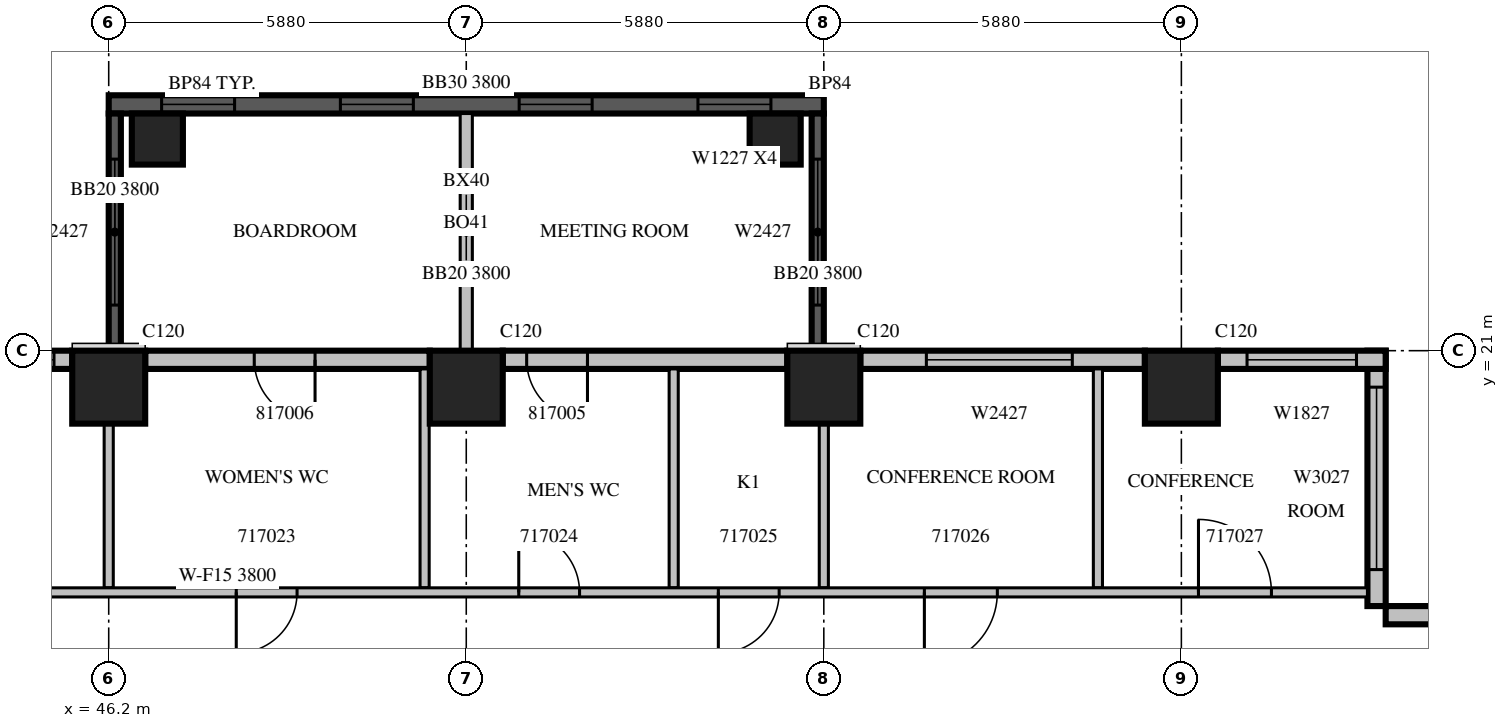
"""IFC4 building model, lengths in metres.
Left out: names, types, materials, properties, quantities, classifications, styles, units other than length and angle.
Written with IfcOpenShell. Run it as: python <this file> out.ifc"""

import sys

from ifc_helpers import new_model, si_unit, direction, frame, frame_2d, origin, origin_2d, place, context, subcontext, project, spatial, rectangle, extrude, source, transform, mapped, element, fill, save


model = new_model("IFC4")
c1 = context("Model", 3, precision=1e-05, world=origin(), true_north=direction((0.0, 1.0)))
c2 = subcontext(c1, "Body", "Model", "MODEL_VIEW")
j1 = project(units=[si_unit("LENGTHUNIT", "METRE"), si_unit("PLANEANGLEUNIT", "RADIAN")], contexts=[c1])
p1 = place(None, origin())
s1 = spatial("IfcSite", under=j1, at=p1, CompositionType="ELEMENT")
p2 = place(p1, origin())
s2 = spatial("IfcBuilding", under=s1, at=p2, CompositionType="ELEMENT")
p3 = place(p2, frame((0.0, 0.0, 82.5)))
s3 = spatial("IfcBuildingStorey", under=s2, at=p3, CompositionType="ELEMENT", Elevation=82.5)
m1 = source(origin(), c2, "Body", "SweptSolid", [
    extrude(rectangle(XDim=1.2, YDim=1.2, at=origin_2d()), origin(), (0.0, 0.0, 1.0), 4.2),
])
for number, where, z_axis, x_axis in (
    (1, (46.2, 20.4, 0.0), (0.0, 0.0, 1.0), (1.0, 0.0, 0.0)),
    (2, (52.08, 20.4, 0.0), (0.0, 0.0, 1.0), (1.0, 0.0, 0.0)),
    (3, (57.96, 20.4, 0.0), (0.0, 0.0, 1.0), (1.0, 0.0, 0.0)),
    (4, (63.84, 20.4, 0.0), (0.0, 0.0, 1.0), (1.0, 0.0, 0.0)),
):
    element("IfcColumn", number, at=place(p3, frame(where, z_axis=z_axis, x_axis=x_axis)), inside=s3, PredefinedType="COLUMN", context=c2, shape_type="MappedRepresentation", body=[
        mapped(m1, transform((0.0, 0.0, 0.0), scale=1.0)),
    ])
m2 = source(origin(), c2, "Body", "SweptSolid", [
    extrude(rectangle(XDim=0.84, YDim=0.84, at=origin_2d()), origin(), (0.0, 0.0, 1.0), 4.2),
])
for number, where, z_axis, x_axis in (
    (5, (47.0, 24.48, 0.0), (0.0, 0.0, 1.0), (1.0, 0.0, 0.0)),
    (6, (57.16, 24.48, 0.0), (0.0, 0.0, 1.0), (1.0, 0.0, 0.0)),
):
    element("IfcColumn", number, at=place(p3, frame(where, z_axis=z_axis, x_axis=x_axis)), inside=s3, PredefinedType="COLUMN", context=c2, shape_type="MappedRepresentation", body=[
        mapped(m2, transform((0.0, 0.0, 0.0), scale=1.0)),
    ])
p4 = place(p3, frame((57.96, 25.05, 0.0), z_axis=(0.0, 0.0, 1.0), x_axis=(-1.0, 0.0, 0.0)))
e7 = element("IfcWall", 7, at=p4, inside=s3, PredefinedType="SOLIDWALL", context=c2, shape_type="SweptSolid", body=[
    extrude(rectangle(XDim=11.76, YDim=0.3, at=frame_2d((5.88, 0.0))), origin(), (0.0, 0.0, 1.0), 3.8),
])
m3 = source(origin(), c2, "Body", "SweptSolid", [
    extrude(rectangle(XDim=1.2, YDim=2.7, at=frame_2d((0.6, 1.35))), frame((0.0, 0.16, 0.0), z_axis=(0.0, -1.0, 0.0), x_axis=(1.0, 0.0, 0.0)), (0.0, 0.0, 1.0), 0.32),
])
p5 = place(p4, frame((0.87, 0.0, 0.6)))
e8 = element("IfcOpeningElement", 8, at=p5, cuts=e7, PredefinedType="OPENING", context=c2, shape_type="MappedRepresentation", body=[
    mapped(m3, transform((0.0, 0.0, 0.0), scale=1.0)),
])
p6 = place(p4, frame((3.81, 0.0, 0.6)))
e9 = element("IfcOpeningElement", 9, at=p6, cuts=e7, PredefinedType="OPENING", context=c2, shape_type="MappedRepresentation", body=[
    mapped(m3, transform((0.0, 0.0, 0.0), scale=1.0)),
])
p7 = place(p4, frame((6.75, 0.0, 0.6)))
e10 = element("IfcOpeningElement", 10, at=p7, cuts=e7, PredefinedType="OPENING", context=c2, shape_type="MappedRepresentation", body=[
    mapped(m3, transform((0.0, 0.0, 0.0), scale=1.0)),
])
p8 = place(p4, frame((9.69, 0.0, 0.6)))
e11 = element("IfcOpeningElement", 11, at=p8, cuts=e7, PredefinedType="OPENING", context=c2, shape_type="MappedRepresentation", body=[
    mapped(m3, transform((0.0, 0.0, 0.0), scale=1.0)),
])
p9 = place(p3, frame((52.08, 21.0, 0.0), z_axis=(0.0, 0.0, 1.0), x_axis=(0.0, 1.0, 0.0)))
e12 = element("IfcWall", 12, at=p9, inside=s3, PredefinedType="SOLIDWALL", context=c2, shape_type="SweptSolid", body=[
    extrude(rectangle(XDim=3.9, YDim=0.2, at=frame_2d((1.95, 0.0))), origin(), (0.0, 0.0, 1.0), 3.8),
])
m4 = source(origin(), c2, "Body", "SweptSolid", [
    extrude(rectangle(XDim=3.9, YDim=0.2, at=frame_2d((1.95, 0.0))), origin(), (0.0, 0.0, 1.0), 3.8),
])
p10 = place(p3, frame((57.86, 21.0, 0.0), z_axis=(0.0, 0.0, 1.0), x_axis=(0.0, 1.0, 0.0)))
e13 = element("IfcWall", 13, at=p10, inside=s3, PredefinedType="SOLIDWALL", context=c2, shape_type="MappedRepresentation", body=[
    mapped(m4, transform((0.0, 0.0, 0.0), scale=1.0)),
])
m5 = source(origin(), c2, "Body", "SweptSolid", [
    extrude(rectangle(XDim=2.4, YDim=2.7, at=frame_2d((1.2, 1.35))), frame((0.0, 0.11, 0.0), z_axis=(0.0, -1.0, 0.0), x_axis=(1.0, 0.0, 0.0)), (0.0, 0.0, 1.0), 0.22),
])
p11 = place(p10, frame((0.75, 0.0, 0.6)))
e14 = element("IfcOpeningElement", 14, at=p11, cuts=e13, PredefinedType="OPENING", context=c2, shape_type="MappedRepresentation", body=[
    mapped(m5, transform((0.0, 0.0, 0.0), scale=1.0)),
])
p12 = place(p3, frame((46.3, 21.0, 0.0), z_axis=(0.0, 0.0, 1.0), x_axis=(0.0, 1.0, 0.0)))
e15 = element("IfcWall", 15, at=p12, inside=s3, PredefinedType="SOLIDWALL", context=c2, shape_type="MappedRepresentation", body=[
    mapped(m4, transform((0.0, 0.0, 0.0), scale=1.0)),
])
p13 = place(p12, frame((0.75, 0.0, 0.6)))
e16 = element("IfcOpeningElement", 16, at=p13, cuts=e15, PredefinedType="OPENING", context=c2, shape_type="MappedRepresentation", body=[
    mapped(m5, transform((0.0, 0.0, 0.0), scale=1.0)),
])
m6 = source(origin(), c2, "Body", "SweptSolid", [
    extrude(rectangle(XDim=4.2, YDim=0.3, at=frame_2d((2.1, 0.0))), origin(), (0.0, 0.0, 1.0), 3.8),
])
p14 = place(p3, frame((71.4, 16.65, 0.0), z_axis=(0.0, 0.0, 1.0), x_axis=(-1.0, 0.0, 0.0)))
e17 = element("IfcWall", 17, at=p14, inside=s3, PredefinedType="STANDARD", context=c2, shape_type="MappedRepresentation", body=[
    mapped(m6, transform((0.0, 0.0, 0.0), scale=1.0)),
])
p15 = place(p14, frame((0.66, 0.0, 0.6)))
e18 = element("IfcOpeningElement", 18, at=p15, cuts=e17, PredefinedType="OPENING", context=c2, shape_type="MappedRepresentation", body=[
    mapped(m3, transform((0.0, 0.0, 0.0), scale=1.0)),
])
p16 = place(p3, frame((67.05, 16.8, 0.0), z_axis=(0.0, 0.0, 1.0), x_axis=(0.0, 1.0, 0.0)))
e19 = element("IfcWall", 19, at=p16, inside=s3, PredefinedType="STANDARD", context=c2, shape_type="MappedRepresentation", body=[
    mapped(m6, transform((0.0, 0.0, 0.0), scale=1.0)),
])
m7 = source(origin(), c2, "Body", "SweptSolid", [
    extrude(rectangle(XDim=3.0, YDim=2.7, at=frame_2d((1.5, 1.35))), frame((0.0, 0.16, 0.0), z_axis=(0.0, -1.0, 0.0), x_axis=(1.0, 0.0, 0.0)), (0.0, 0.0, 1.0), 0.32),
])
p17 = place(p16, frame((0.6, 0.0, 0.6)))
e20 = element("IfcOpeningElement", 20, at=p17, cuts=e19, PredefinedType="OPENING", context=c2, shape_type="MappedRepresentation", body=[
    mapped(m7, transform((0.0, 0.0, 0.0), scale=1.0)),
])
m8 = source(origin(), c2, "Body", "SweptSolid", [
    extrude(rectangle(XDim=2.76, YDim=0.3, at=frame_2d((1.38, 0.0))), origin(), (0.0, 0.0, 1.0), 3.8),
])
p18 = place(p3, frame((67.2, 20.85, 0.0), z_axis=(0.0, 0.0, 1.0), x_axis=(-1.0, 0.0, 0.0)))
e21 = element("IfcWall", 21, at=p18, inside=s3, PredefinedType="STANDARD", context=c2, shape_type="MappedRepresentation", body=[
    mapped(m8, transform((0.0, 0.0, 0.0), scale=1.0)),
])
m9 = source(origin(), c2, "Body", "SweptSolid", [
    extrude(rectangle(XDim=1.8, YDim=2.7, at=frame_2d((0.9, 1.35))), frame((0.0, 0.16, 0.0), z_axis=(0.0, -1.0, 0.0), x_axis=(1.0, 0.0, 0.0)), (0.0, 0.0, 1.0), 0.32),
])
p19 = place(p18, frame((0.48, 0.0, 0.6)))
e22 = element("IfcOpeningElement", 22, at=p19, cuts=e21, PredefinedType="OPENING", context=c2, shape_type="MappedRepresentation", body=[
    mapped(m9, transform((0.0, 0.0, 0.0), scale=1.0)),
])
m10 = source(origin(), c2, "Body", "SweptSolid", [
    extrude(rectangle(XDim=4.68, YDim=0.3, at=frame_2d((2.34, 0.0))), origin(), (0.0, 0.0, 1.0), 3.8),
])
p20 = place(p3, frame((63.24, 20.85, 0.0), z_axis=(0.0, 0.0, 1.0), x_axis=(-1.0, 0.0, 0.0)))
e23 = element("IfcWall", 23, at=p20, inside=s3, PredefinedType="STANDARD", context=c2, shape_type="MappedRepresentation", body=[
    mapped(m10, transform((0.0, 0.0, 0.0), scale=1.0)),
])
m11 = source(origin(), c2, "Body", "SweptSolid", [
    extrude(rectangle(XDim=2.4, YDim=2.7, at=frame_2d((1.2, 1.35))), frame((0.0, 0.16, 0.0), z_axis=(0.0, -1.0, 0.0), x_axis=(1.0, 0.0, 0.0)), (0.0, 0.0, 1.0), 0.32),
])
p21 = place(p20, frame((1.194, 0.0, 0.6)))
e24 = element("IfcOpeningElement", 24, at=p21, cuts=e23, PredefinedType="OPENING", context=c2, shape_type="MappedRepresentation", body=[
    mapped(m11, transform((0.0, 0.0, 0.0), scale=1.0)),
])
p22 = place(p3, frame((57.36, 20.85, 0.0), z_axis=(0.0, 0.0, 1.0), x_axis=(-1.0, 0.0, 0.0)))
e25 = element("IfcWall", 25, at=p22, inside=s3, PredefinedType="STANDARD", context=c2, shape_type="MappedRepresentation", body=[
    mapped(m10, transform((0.0, 0.0, 0.0), scale=1.0)),
])
m12 = source(origin(), c2, "Body", "SweptSolid", [
    extrude(rectangle(XDim=1.0, YDim=2.1, at=frame_2d((0.5, 1.05))), frame((0.0, 0.16, 0.0), z_axis=(0.0, -1.0, 0.0), x_axis=(1.0, 0.0, 0.0)), (0.0, 0.0, 1.0), 0.32),
])
p23 = place(p22, frame((3.287, 0.0, 0.0)))
e26 = element("IfcOpeningElement", 26, at=p23, cuts=e25, PredefinedType="OPENING", context=c2, shape_type="MappedRepresentation", body=[
    mapped(m12, transform((0.0, 0.0, 0.0), scale=1.0)),
])
p24 = place(p3, frame((51.48, 20.85, 0.0), z_axis=(0.0, 0.0, 1.0), x_axis=(-1.0, 0.0, 0.0)))
e27 = element("IfcWall", 27, at=p24, inside=s3, PredefinedType="STANDARD", context=c2, shape_type="MappedRepresentation", body=[
    mapped(m10, transform((0.0, 0.0, 0.0), scale=1.0)),
])
p25 = place(p24, frame((1.887, 0.0, 0.0)))
e28 = element("IfcOpeningElement", 28, at=p25, cuts=e27, PredefinedType="OPENING", context=c2, shape_type="MappedRepresentation", body=[
    mapped(m12, transform((0.0, 0.0, 0.0), scale=1.0)),
])
m13 = source(origin(), c2, "Body", "SweptSolid", [
    extrude(rectangle(XDim=7.2, YDim=0.3, at=frame_2d((3.6, 0.0))), origin(), (0.0, 0.0, 1.0), 3.8),
])
p26 = place(p3, frame((45.6, 20.85, 0.0), z_axis=(0.0, 0.0, 1.0), x_axis=(-1.0, 0.0, 0.0)))
e29 = element("IfcWall", 29, at=p26, inside=s3, PredefinedType="STANDARD", context=c2, shape_type="MappedRepresentation", body=[
    mapped(m13, transform((0.0, 0.0, 0.0), scale=1.0)),
])
p27 = place(p26, frame((0.3, 0.0, 0.6)))
e30 = element("IfcOpeningElement", 30, at=p27, cuts=e29, PredefinedType="OPENING", context=c2, shape_type="MappedRepresentation", body=[
    mapped(m11, transform((0.0, 0.0, 0.0), scale=1.0)),
])
p28 = place(p26, frame((3.75, 0.0, 0.6)))
e31 = element("IfcOpeningElement", 31, at=p28, cuts=e29, PredefinedType="OPENING", context=c2, shape_type="MappedRepresentation", body=[
    mapped(m11, transform((0.0, 0.0, 0.0), scale=1.0)),
])
m14 = source(origin(), c2, "Body", "SweptSolid", [
    extrude(rectangle(XDim=3.6, YDim=0.15, at=frame_2d((1.8, 0.0))), origin(), (0.0, 0.0, 1.0), 3.8),
])
for number, where, z_axis, x_axis in (
    (32, (51.395, 20.7, 0.0), (0.0, 0.0, 1.0), (0.0, -1.0, 0.0)),
    (33, (55.491, 20.7, 0.0), (0.0, 0.0, 1.0), (0.0, -1.0, 0.0)),
    (34, (62.468, 20.7, 0.0), (0.0, 0.0, 1.0), (0.0, -1.0, 0.0)),
):
    element("IfcWall", number, at=place(p3, frame(where, z_axis=z_axis, x_axis=x_axis)), inside=s3, PredefinedType="PARTITIONING", context=c2, shape_type="MappedRepresentation", body=[
        mapped(m14, transform((0.0, 0.0, 0.0), scale=1.0)),
    ])
m15 = source(origin(), c2, "Body", "SweptSolid", [
    extrude(rectangle(XDim=2.701, YDim=0.15, at=frame_2d((1.351, 0.0))), origin(), (0.0, 0.0, 1.0), 3.8),
])
for number, where, z_axis, x_axis in (
    (35, (46.2, 17.1, 0.0), (0.0, 0.0, 1.0), (0.0, 1.0, 0.0)),
    (36, (57.96, 17.1, 0.0), (0.0, 0.0, 1.0), (0.0, 1.0, 0.0)),
):
    element("IfcWall", number, at=place(p3, frame(where, z_axis=z_axis, x_axis=x_axis)), inside=s3, PredefinedType="PARTITIONING", context=c2, shape_type="MappedRepresentation", body=[
        mapped(m15, transform((0.0, 0.0, 0.0), scale=1.0)),
    ])
m16 = source(origin(), c2, "Body", "SweptSolid", [
    extrude(rectangle(XDim=37.5, YDim=0.15, at=frame_2d((18.75, 0.0))), origin(), (0.0, 0.0, 1.0), 3.8),
])
p29 = place(p3, frame((29.4, 17.025, 0.0), z_axis=(0.0, 0.0, 1.0), x_axis=(1.0, 0.0, 0.0)))
e37 = element("IfcWall", 37, at=p29, inside=s3, PredefinedType="PARTITIONING", context=c2, shape_type="MappedRepresentation", body=[
    mapped(m16, transform((0.0, 0.0, 0.0), scale=1.0)),
])
m17 = source(origin(), c2, "Body", "SweptSolid", [
    extrude(rectangle(XDim=1.0, YDim=2.1, at=frame_2d((0.5, 1.05))), frame((0.0, 0.085, 0.0), z_axis=(0.0, -1.0, 0.0), x_axis=(1.0, 0.0, 0.0)), (0.0, 0.0, 1.0), 0.17),
])
p30 = place(p29, frame((1.357, 0.0, 0.0)))
e38 = element("IfcOpeningElement", 38, at=p30, cuts=e37, PredefinedType="OPENING", context=c2, shape_type="MappedRepresentation", body=[
    mapped(m17, transform((0.0, 0.0, 0.0), scale=1.0)),
])
p31 = place(p29, frame((4.669, 0.0, 0.0)))
e39 = element("IfcOpeningElement", 39, at=p31, cuts=e37, PredefinedType="OPENING", context=c2, shape_type="MappedRepresentation", body=[
    mapped(m17, transform((0.0, 0.0, 0.0), scale=1.0)),
])
p32 = place(p29, frame((7.012, 0.0, 0.0)))
e40 = element("IfcOpeningElement", 40, at=p32, cuts=e37, PredefinedType="OPENING", context=c2, shape_type="MappedRepresentation", body=[
    mapped(m17, transform((0.0, 0.0, 0.0), scale=1.0)),
])
p33 = place(p29, frame((12.1, 0.0, 0.0)))
e41 = element("IfcOpeningElement", 41, at=p33, cuts=e37, PredefinedType="OPENING", context=c2, shape_type="MappedRepresentation", body=[
    mapped(m17, transform((0.0, 0.0, 0.0), scale=1.0)),
])
p34 = place(p29, frame((18.898, 0.0, 0.0)))
e42 = element("IfcOpeningElement", 42, at=p34, cuts=e37, PredefinedType="OPENING", context=c2, shape_type="MappedRepresentation", body=[
    mapped(m17, transform((0.0, 0.0, 0.0), scale=1.0)),
])
p35 = place(p29, frame((23.543, 0.0, 0.0)))
e43 = element("IfcOpeningElement", 43, at=p35, cuts=e37, PredefinedType="OPENING", context=c2, shape_type="MappedRepresentation", body=[
    mapped(m17, transform((0.0, 0.0, 0.0), scale=1.0)),
])
p36 = place(p29, frame((26.826, 0.0, 0.0)))
e44 = element("IfcOpeningElement", 44, at=p36, cuts=e37, PredefinedType="OPENING", context=c2, shape_type="MappedRepresentation", body=[
    mapped(m17, transform((0.0, 0.0, 0.0), scale=1.0)),
])
m18 = source(origin(), c2, "Body", "SweptSolid", [
    extrude(rectangle(XDim=1.2, YDim=2.1, at=frame_2d((0.6, 1.05))), frame((0.0, 0.085, 0.0), z_axis=(0.0, -1.0, 0.0), x_axis=(1.0, 0.0, 0.0)), (0.0, 0.0, 1.0), 0.17),
])
p37 = place(p29, frame((30.214, 0.0, 0.0)))
e45 = element("IfcOpeningElement", 45, at=p37, cuts=e37, PredefinedType="OPENING", context=c2, shape_type="MappedRepresentation", body=[
    mapped(m18, transform((0.0, 0.0, 0.0), scale=1.0)),
])
p38 = place(p29, frame((34.721, 0.0, 0.0)))
e46 = element("IfcOpeningElement", 46, at=p38, cuts=e37, PredefinedType="OPENING", context=c2, shape_type="MappedRepresentation", body=[
    mapped(m18, transform((0.0, 0.0, 0.0), scale=1.0)),
])
m19 = source(origin(), c2, "Body", "SweptSolid", [
    extrude(rectangle(XDim=1.2, YDim=2.7, at=frame_2d((0.6, 1.35))), frame((0.0, 0.03, 0.0), z_axis=(0.0, -1.0, 0.0), x_axis=(1.0, 0.0, 0.0)), (0.0, 0.0, 1.0), 0.06),
])
p39 = place(p5, origin())
e47 = element("IfcWindow", 47, at=p39, inside=s3, PartitioningType="SINGLE_PANEL", PredefinedType="WINDOW", context=c2, shape_type="MappedRepresentation", body=[
    mapped(m19, transform((0.0, 0.0, 0.0), scale=1.0)),
])
fill(e8, e47)
p40 = place(p6, origin())
e48 = element("IfcWindow", 48, at=p40, inside=s3, PartitioningType="SINGLE_PANEL", PredefinedType="WINDOW", context=c2, shape_type="MappedRepresentation", body=[
    mapped(m19, transform((0.0, 0.0, 0.0), scale=1.0)),
])
fill(e9, e48)
p41 = place(p7, origin())
e49 = element("IfcWindow", 49, at=p41, inside=s3, PartitioningType="SINGLE_PANEL", PredefinedType="WINDOW", context=c2, shape_type="MappedRepresentation", body=[
    mapped(m19, transform((0.0, 0.0, 0.0), scale=1.0)),
])
fill(e10, e49)
p42 = place(p8, origin())
e50 = element("IfcWindow", 50, at=p42, inside=s3, PartitioningType="SINGLE_PANEL", PredefinedType="WINDOW", context=c2, shape_type="MappedRepresentation", body=[
    mapped(m19, transform((0.0, 0.0, 0.0), scale=1.0)),
])
fill(e11, e50)
m20 = source(origin(), c2, "Body", "SweptSolid", [
    extrude(rectangle(XDim=2.4, YDim=2.7, at=frame_2d((1.2, 1.35))), frame((0.0, 0.03, 0.0), z_axis=(0.0, -1.0, 0.0), x_axis=(1.0, 0.0, 0.0)), (0.0, 0.0, 1.0), 0.06),
])
p43 = place(p11, origin())
e51 = element("IfcWindow", 51, at=p43, inside=s3, PartitioningType="SINGLE_PANEL", PredefinedType="WINDOW", context=c2, shape_type="MappedRepresentation", body=[
    mapped(m20, transform((0.0, 0.0, 0.0), scale=1.0)),
])
fill(e14, e51)
p44 = place(p13, origin())
e52 = element("IfcWindow", 52, at=p44, inside=s3, PartitioningType="SINGLE_PANEL", PredefinedType="WINDOW", context=c2, shape_type="MappedRepresentation", body=[
    mapped(m20, transform((0.0, 0.0, 0.0), scale=1.0)),
])
fill(e16, e52)
m21 = source(origin(), c2, "Body", "SweptSolid", [
    extrude(rectangle(XDim=3.0, YDim=2.7, at=frame_2d((1.5, 1.35))), frame((0.0, 0.03, 0.0), z_axis=(0.0, -1.0, 0.0), x_axis=(1.0, 0.0, 0.0)), (0.0, 0.0, 1.0), 0.06),
])
p45 = place(p17, origin())
e53 = element("IfcWindow", 53, at=p45, inside=s3, PartitioningType="SINGLE_PANEL", PredefinedType="WINDOW", context=c2, shape_type="MappedRepresentation", body=[
    mapped(m21, transform((0.0, 0.0, 0.0), scale=1.0)),
])
fill(e20, e53)
p46 = place(p21, origin())
e54 = element("IfcWindow", 54, at=p46, inside=s3, PartitioningType="SINGLE_PANEL", PredefinedType="WINDOW", context=c2, shape_type="MappedRepresentation", body=[
    mapped(m20, transform((0.0, 0.0, 0.0), scale=1.0)),
])
fill(e24, e54)
m22 = source(origin(), c2, "Body", "SweptSolid", [
    extrude(rectangle(XDim=1.8, YDim=2.7, at=frame_2d((0.9, 1.35))), frame((0.0, 0.03, 0.0), z_axis=(0.0, -1.0, 0.0), x_axis=(1.0, 0.0, 0.0)), (0.0, 0.0, 1.0), 0.06),
])
p47 = place(p19, origin())
e55 = element("IfcWindow", 55, at=p47, inside=s3, PartitioningType="SINGLE_PANEL", PredefinedType="WINDOW", context=c2, shape_type="MappedRepresentation", body=[
    mapped(m22, transform((0.0, 0.0, 0.0), scale=1.0)),
])
fill(e22, e55)
p48 = place(p27, origin())
e56 = element("IfcWindow", 56, at=p48, inside=s3, PartitioningType="SINGLE_PANEL", PredefinedType="WINDOW", context=c2, shape_type="MappedRepresentation", body=[
    mapped(m20, transform((0.0, 0.0, 0.0), scale=1.0)),
])
fill(e30, e56)
m23 = source(origin(), c2, "Body", "SweptSolid", [
    extrude(rectangle(XDim=1.0, YDim=2.1, at=frame_2d((0.5, 1.05))), frame((0.0, 0.025, 0.0), z_axis=(0.0, -1.0, 0.0), x_axis=(1.0, 0.0, 0.0)), (0.0, 0.0, 1.0), 0.05),
])
p49 = place(p34, origin())
e57 = element("IfcDoor", 57, at=p49, inside=s3, OperationType="SINGLE_SWING_RIGHT", PredefinedType="DOOR", context=c2, shape_type="MappedRepresentation", body=[
    mapped(m23, transform((0.0, 0.0, 0.0), scale=1.0)),
])
fill(e42, e57)
p50 = place(p35, origin())
e58 = element("IfcDoor", 58, at=p50, inside=s3, OperationType="SINGLE_SWING_LEFT", PredefinedType="DOOR", context=c2, shape_type="MappedRepresentation", body=[
    mapped(m23, transform((0.0, 0.0, 0.0), scale=1.0)),
])
fill(e43, e58)
p51 = place(p36, origin())
e59 = element("IfcDoor", 59, at=p51, inside=s3, OperationType="SINGLE_SWING_RIGHT", PredefinedType="DOOR", context=c2, shape_type="MappedRepresentation", body=[
    mapped(m23, transform((0.0, 0.0, 0.0), scale=1.0)),
])
fill(e44, e59)
m24 = source(origin(), c2, "Body", "SweptSolid", [
    extrude(rectangle(XDim=1.2, YDim=2.1, at=frame_2d((0.6, 1.05))), frame((0.0, 0.025, 0.0), z_axis=(0.0, -1.0, 0.0), x_axis=(1.0, 0.0, 0.0)), (0.0, 0.0, 1.0), 0.05),
])
p52 = place(p37, origin())
e60 = element("IfcDoor", 60, at=p52, inside=s3, OperationType="SINGLE_SWING_RIGHT", PredefinedType="DOOR", context=c2, shape_type="MappedRepresentation", body=[
    mapped(m24, transform((0.0, 0.0, 0.0), scale=1.0)),
])
fill(e45, e60)
p53 = place(p38, origin())
e61 = element("IfcDoor", 61, at=p53, inside=s3, OperationType="SINGLE_SWING_LEFT", PredefinedType="DOOR", context=c2, shape_type="MappedRepresentation", body=[
    mapped(m24, transform((0.0, 0.0, 0.0), scale=1.0)),
])
fill(e46, e61)
p54 = place(p23, origin())
e62 = element("IfcDoor", 62, at=p54, inside=s3, OperationType="SINGLE_SWING_LEFT", PredefinedType="DOOR", context=c2, shape_type="MappedRepresentation", body=[
    mapped(m23, transform((0.0, 0.0, 0.0), scale=1.0)),
])
fill(e26, e62)
p55 = place(p25, origin())
e63 = element("IfcDoor", 63, at=p55, inside=s3, OperationType="SINGLE_SWING_LEFT", PredefinedType="DOOR", context=c2, shape_type="MappedRepresentation", body=[
    mapped(m23, transform((0.0, 0.0, 0.0), scale=1.0)),
])
fill(e28, e63)
save(model, sys.argv[1])
